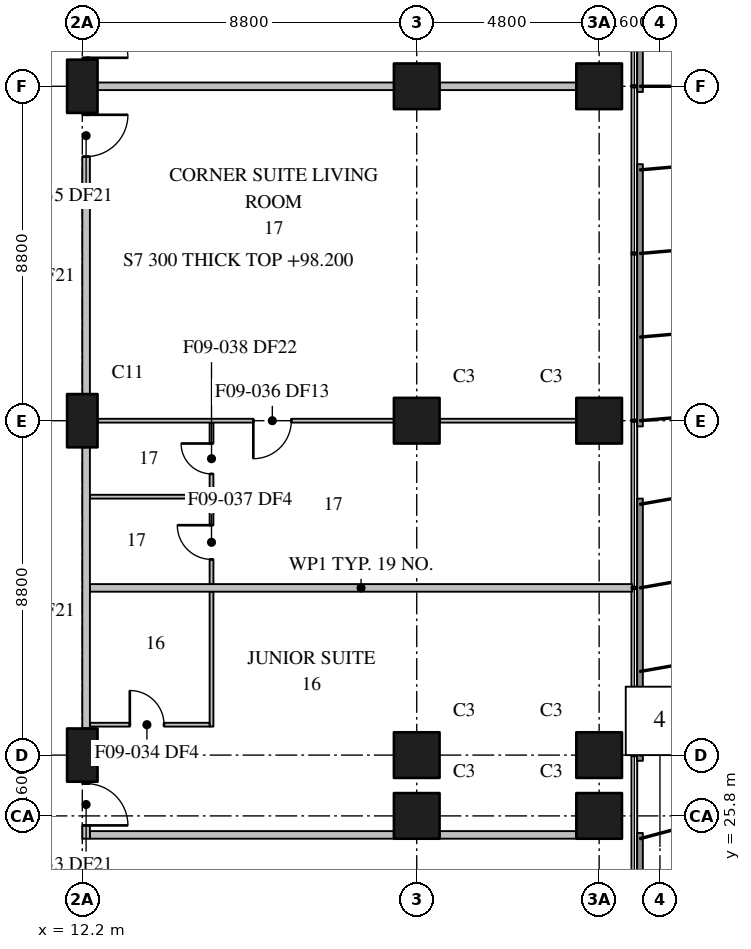
"""IFC4 building model, lengths in metres.
Left out: names, types, materials, properties, quantities, classifications, styles, units other than length and angle.
Written with IfcOpenShell. Run it as: python <this file> out.ifc"""

import sys

from ifc_helpers import new_model, si_unit, direction, frame, frame_2d, origin, origin_2d, place, context, subcontext, project, spatial, rectangle, extrude, element, fill, save


model = new_model("IFC4")
c1 = context("Model", 3, precision=1e-05, world=origin(), true_north=direction((0.0, 1.0)))
c2 = subcontext(c1, "Body", "Model", "MODEL_VIEW")
j1 = project(units=[si_unit("LENGTHUNIT", "METRE"), si_unit("PLANEANGLEUNIT", "RADIAN")], contexts=[c1])
p1 = place(None, origin())
s1 = spatial("IfcSite", under=j1, at=p1, CompositionType="ELEMENT")
p2 = place(p1, origin())
s2 = spatial("IfcBuilding", under=s1, at=p2, CompositionType="ELEMENT")
p3 = place(p2, frame((0.0, 0.0, 98.2)))
s3 = spatial("IfcBuildingStorey", under=s2, at=p3, CompositionType="ELEMENT", Elevation=98.2)
for number, where, z_axis, x_axis in (
    (1, (12.2, 27.4, 0.0), (0.0, 0.0, 1.0), (0.0, 1.0, 0.0)),
    (2, (12.2, 36.2, 0.0), (0.0, 0.0, 1.0), (0.0, 1.0, 0.0)),
    (3, (12.2, 45.0, 0.0), (0.0, 0.0, 1.0), (0.0, 1.0, 0.0)),
):
    element("IfcColumn", number, at=place(p3, frame(where, z_axis=z_axis, x_axis=x_axis)), inside=s3, PredefinedType="COLUMN", context=c2, shape_type="SweptSolid", body=[
        extrude(rectangle(XDim=1.4, YDim=0.8, at=origin_2d()), origin(), (0.0, 0.0, 1.0), 3.7),
    ])
for number, where, z_axis, x_axis in (
    (4, (21.0, 25.8, 0.0), (0.0, 0.0, 1.0), (1.0, 0.0, 0.0)),
    (5, (21.0, 27.4, 0.0), (0.0, 0.0, 1.0), (1.0, 0.0, 0.0)),
    (6, (21.0, 36.2, 0.0), (0.0, 0.0, 1.0), (1.0, 0.0, 0.0)),
    (7, (21.0, 45.0, 0.0), (0.0, 0.0, 1.0), (1.0, 0.0, 0.0)),
    (8, (25.8, 25.8, 0.0), (0.0, 0.0, 1.0), (1.0, 0.0, 0.0)),
    (9, (25.8, 27.4, 0.0), (0.0, 0.0, 1.0), (1.0, 0.0, 0.0)),
    (10, (25.8, 36.2, 0.0), (0.0, 0.0, 1.0), (1.0, 0.0, 0.0)),
    (11, (25.8, 45.0, 0.0), (0.0, 0.0, 1.0), (1.0, 0.0, 0.0)),
):
    element("IfcColumn", number, at=place(p3, frame(where, z_axis=z_axis, x_axis=x_axis)), inside=s3, PredefinedType="COLUMN", context=c2, shape_type="SweptSolid", body=[
        extrude(rectangle(XDim=1.2, YDim=1.2, at=origin_2d()), origin(), (0.0, 0.0, 1.0), 3.7),
    ])
p4 = place(p3, frame((12.4, 31.8, 0.0), z_axis=(0.0, 0.0, 1.0), x_axis=(1.0, 0.0, 0.0)))
e12 = element("IfcWall", 12, at=p4, inside=s3, PredefinedType="PARTITIONING", context=c2, shape_type="SweptSolid", body=[
    extrude(rectangle(XDim=14.27, YDim=0.2, at=frame_2d((7.135, 0.0))), origin(), (0.0, 0.0, 1.0), 3.3),
])
p5 = place(p3, frame((12.3, 26.7, 0.0), z_axis=(0.0, 0.0, 1.0), x_axis=(0.0, -1.0, 0.0)))
e13 = element("IfcWall", 13, at=p5, inside=s3, PredefinedType="PARTITIONING", context=c2, shape_type="SweptSolid", body=[
    extrude(rectangle(XDim=1.5, YDim=0.2, at=frame_2d((0.75, 0.0))), origin(), (0.0, 0.0, 1.0), 3.3),
])
p6 = place(p5, frame((0.05, 0.0, 0.0)))
e14 = element("IfcOpeningElement", 14, at=p6, cuts=e13, PredefinedType="OPENING", context=c2, shape_type="SweptSolid", body=[
    extrude(rectangle(XDim=1.1, YDim=2.1, at=frame_2d((0.55, 1.05))), frame((0.0, 0.11, 0.0), z_axis=(0.0, -1.0, 0.0), x_axis=(1.0, 0.0, 0.0)), (0.0, 0.0, 1.0), 0.22),
])
p7 = place(p3, frame((12.3, 28.1, 0.0), z_axis=(0.0, 0.0, 1.0), x_axis=(0.0, 1.0, 0.0)))
e15 = element("IfcWall", 15, at=p7, inside=s3, PredefinedType="PARTITIONING", context=c2, shape_type="SweptSolid", body=[
    extrude(rectangle(XDim=7.4, YDim=0.2, at=frame_2d((3.7, 0.0))), origin(), (0.0, 0.0, 1.0), 3.3),
])
p8 = place(p3, frame((12.3, 44.3, 0.0), z_axis=(0.0, 0.0, 1.0), x_axis=(0.0, -1.0, 0.0)))
e16 = element("IfcWall", 16, at=p8, inside=s3, PredefinedType="PARTITIONING", context=c2, shape_type="SweptSolid", body=[
    extrude(rectangle(XDim=7.4, YDim=0.2, at=frame_2d((3.7, 0.0))), origin(), (0.0, 0.0, 1.0), 3.3),
])
p9 = place(p8, frame((0.05, 0.0, 0.0)))
e17 = element("IfcOpeningElement", 17, at=p9, cuts=e16, PredefinedType="OPENING", context=c2, shape_type="SweptSolid", body=[
    extrude(rectangle(XDim=1.1, YDim=2.1, at=frame_2d((0.55, 1.05))), frame((0.0, 0.11, 0.0), z_axis=(0.0, -1.0, 0.0), x_axis=(1.0, 0.0, 0.0)), (0.0, 0.0, 1.0), 0.22),
])
p10 = place(p3, frame((12.3, 53.1, 0.0), z_axis=(0.0, 0.0, 1.0), x_axis=(0.0, -1.0, 0.0)))
e18 = element("IfcWall", 18, at=p10, inside=s3, PredefinedType="PARTITIONING", context=c2, shape_type="SweptSolid", body=[
    extrude(rectangle(XDim=7.4, YDim=0.2, at=frame_2d((3.7, 0.0))), origin(), (0.0, 0.0, 1.0), 3.3),
])
p11 = place(p10, frame((6.25, 0.0, 0.0)))
e19 = element("IfcOpeningElement", 19, at=p11, cuts=e18, PredefinedType="OPENING", context=c2, shape_type="SweptSolid", body=[
    extrude(rectangle(XDim=1.1, YDim=2.1, at=frame_2d((0.55, 1.05))), frame((0.0, 0.11, 0.0), z_axis=(0.0, -1.0, 0.0), x_axis=(1.0, 0.0, 0.0)), (0.0, 0.0, 1.0), 0.22),
])
p12 = place(p3, frame((12.4, 25.3, 0.0), z_axis=(0.0, 0.0, 1.0), x_axis=(1.0, 0.0, 0.0)))
e20 = element("IfcWall", 20, at=p12, inside=s3, PredefinedType="PARTITIONING", context=c2, shape_type="SweptSolid", body=[
    extrude(rectangle(XDim=8.0, YDim=0.2, at=frame_2d((4.0, 0.0))), origin(), (0.0, 0.0, 1.0), 3.3),
])
p13 = place(p3, frame((21.6, 25.3, 0.0), z_axis=(0.0, 0.0, 1.0), x_axis=(1.0, 0.0, 0.0)))
e21 = element("IfcWall", 21, at=p13, inside=s3, PredefinedType="PARTITIONING", context=c2, shape_type="SweptSolid", body=[
    extrude(rectangle(XDim=3.6, YDim=0.2, at=frame_2d((1.8, 0.0))), origin(), (0.0, 0.0, 1.0), 3.3),
])
p14 = place(p3, frame((12.6, 45.0, 0.0), z_axis=(0.0, 0.0, 1.0), x_axis=(1.0, 0.0, 0.0)))
e22 = element("IfcWall", 22, at=p14, inside=s3, PredefinedType="PARTITIONING", context=c2, shape_type="SweptSolid", body=[
    extrude(rectangle(XDim=7.8, YDim=0.2, at=frame_2d((3.9, 0.0))), origin(), (0.0, 0.0, 1.0), 3.3),
])
p15 = place(p3, frame((21.6, 45.0, 0.0), z_axis=(0.0, 0.0, 1.0), x_axis=(1.0, 0.0, 0.0)))
e23 = element("IfcWall", 23, at=p15, inside=s3, PredefinedType="PARTITIONING", context=c2, shape_type="SweptSolid", body=[
    extrude(rectangle(XDim=3.6, YDim=0.2, at=frame_2d((1.8, 0.0))), origin(), (0.0, 0.0, 1.0), 3.3),
])
p16 = place(p3, frame((15.6, 28.15, 0.0), z_axis=(0.0, 0.0, 1.0), x_axis=(0.0, 1.0, 0.0)))
e24 = element("IfcWall", 24, at=p16, inside=s3, PredefinedType="PARTITIONING", context=c2, shape_type="SweptSolid", body=[
    extrude(rectangle(XDim=3.55, YDim=0.1, at=frame_2d((1.775, 0.0))), origin(), (0.0, 0.0, 1.0), 3.3),
])
p17 = place(p3, frame((15.6, 31.9, 0.0), z_axis=(0.0, 0.0, 1.0), x_axis=(0.0, 1.0, 0.0)))
e25 = element("IfcWall", 25, at=p17, inside=s3, PredefinedType="PARTITIONING", context=c2, shape_type="SweptSolid", body=[
    extrude(rectangle(XDim=4.25, YDim=0.1, at=frame_2d((2.125, 0.0))), origin(), (0.0, 0.0, 1.0), 3.3),
])
p18 = place(p17, frame((0.65, 0.0, 0.0)))
e26 = element("IfcOpeningElement", 26, at=p18, cuts=e25, PredefinedType="OPENING", context=c2, shape_type="SweptSolid", body=[
    extrude(rectangle(XDim=0.9, YDim=2.1, at=frame_2d((0.45, 1.05))), frame((0.0, 0.06, 0.0), z_axis=(0.0, -1.0, 0.0), x_axis=(1.0, 0.0, 0.0)), (0.0, 0.0, 1.0), 0.12),
])
p19 = place(p17, frame((2.9, 0.0, 0.0)))
e27 = element("IfcOpeningElement", 27, at=p19, cuts=e25, PredefinedType="OPENING", context=c2, shape_type="SweptSolid", body=[
    extrude(rectangle(XDim=0.8, YDim=2.1, at=frame_2d((0.4, 1.05))), frame((0.0, 0.06, 0.0), z_axis=(0.0, -1.0, 0.0), x_axis=(1.0, 0.0, 0.0)), (0.0, 0.0, 1.0), 0.12),
])
p20 = place(p3, frame((12.4, 28.2, 0.0), z_axis=(0.0, 0.0, 1.0), x_axis=(1.0, 0.0, 0.0)))
e28 = element("IfcWall", 28, at=p20, inside=s3, PredefinedType="PARTITIONING", context=c2, shape_type="SweptSolid", body=[
    extrude(rectangle(XDim=3.15, YDim=0.1, at=frame_2d((1.575, 0.0))), origin(), (0.0, 0.0, 1.0), 3.3),
])
p21 = place(p20, frame((1.05, 0.0, 0.0)))
e29 = element("IfcOpeningElement", 29, at=p21, cuts=e28, PredefinedType="OPENING", context=c2, shape_type="SweptSolid", body=[
    extrude(rectangle(XDim=0.9, YDim=2.1, at=frame_2d((0.45, 1.05))), frame((0.0, 0.06, 0.0), z_axis=(0.0, -1.0, 0.0), x_axis=(1.0, 0.0, 0.0)), (0.0, 0.0, 1.0), 0.12),
])
p22 = place(p3, frame((20.4, 36.2, 0.0), z_axis=(0.0, 0.0, 1.0), x_axis=(-1.0, 0.0, 0.0)))
e30 = element("IfcWall", 30, at=p22, inside=s3, PredefinedType="PARTITIONING", context=c2, shape_type="SweptSolid", body=[
    extrude(rectangle(XDim=7.8, YDim=0.1, at=frame_2d((3.9, 0.0))), origin(), (0.0, 0.0, 1.0), 3.3),
])
p23 = place(p22, frame((2.7, 0.0, 0.0)))
e31 = element("IfcOpeningElement", 31, at=p23, cuts=e30, PredefinedType="OPENING", context=c2, shape_type="SweptSolid", body=[
    extrude(rectangle(XDim=1.0, YDim=2.1, at=frame_2d((0.5, 1.05))), frame((0.0, 0.06, 0.0), z_axis=(0.0, -1.0, 0.0), x_axis=(1.0, 0.0, 0.0)), (0.0, 0.0, 1.0), 0.12),
])
p24 = place(p3, frame((21.6, 36.2, 0.0), z_axis=(0.0, 0.0, 1.0), x_axis=(1.0, 0.0, 0.0)))
e32 = element("IfcWall", 32, at=p24, inside=s3, PredefinedType="PARTITIONING", context=c2, shape_type="SweptSolid", body=[
    extrude(rectangle(XDim=3.6, YDim=0.1, at=frame_2d((1.8, 0.0))), origin(), (0.0, 0.0, 1.0), 3.3),
])
p25 = place(p3, frame((12.4, 34.2, 0.0), z_axis=(0.0, 0.0, 1.0), x_axis=(1.0, 0.0, 0.0)))
e33 = element("IfcWall", 33, at=p25, inside=s3, PredefinedType="PARTITIONING", context=c2, shape_type="SweptSolid", body=[
    extrude(rectangle(XDim=3.15, YDim=0.1, at=frame_2d((1.575, 0.0))), origin(), (0.0, 0.0, 1.0), 3.3),
])
p26 = place(p6, origin())
e34 = element("IfcDoor", 34, at=p26, inside=s3, OperationType="SINGLE_SWING_RIGHT", PredefinedType="DOOR", context=c2, shape_type="SweptSolid", body=[
    extrude(rectangle(XDim=1.1, YDim=2.1, at=frame_2d((0.55, 1.05))), frame((0.0, 0.025, 0.0), z_axis=(0.0, -1.0, 0.0), x_axis=(1.0, 0.0, 0.0)), (0.0, 0.0, 1.0), 0.05),
])
fill(e14, e34)
p27 = place(p21, origin())
e35 = element("IfcDoor", 35, at=p27, inside=s3, OperationType="SINGLE_SWING_LEFT", PredefinedType="DOOR", context=c2, shape_type="SweptSolid", body=[
    extrude(rectangle(XDim=0.9, YDim=2.1, at=frame_2d((0.45, 1.05))), frame((0.0, 0.025, 0.0), z_axis=(0.0, -1.0, 0.0), x_axis=(1.0, 0.0, 0.0)), (0.0, 0.0, 1.0), 0.05),
])
fill(e29, e35)
p28 = place(p9, origin())
e36 = element("IfcDoor", 36, at=p28, inside=s3, OperationType="SINGLE_SWING_LEFT", PredefinedType="DOOR", context=c2, shape_type="SweptSolid", body=[
    extrude(rectangle(XDim=1.1, YDim=2.1, at=frame_2d((0.55, 1.05))), frame((0.0, 0.025, 0.0), z_axis=(0.0, -1.0, 0.0), x_axis=(1.0, 0.0, 0.0)), (0.0, 0.0, 1.0), 0.05),
])
fill(e17, e36)
p29 = place(p23, origin())
e37 = element("IfcDoor", 37, at=p29, inside=s3, OperationType="SINGLE_SWING_RIGHT", PredefinedType="DOOR", context=c2, shape_type="SweptSolid", body=[
    extrude(rectangle(XDim=1.0, YDim=2.1, at=frame_2d((0.5, 1.05))), frame((0.0, 0.025, 0.0), z_axis=(0.0, -1.0, 0.0), x_axis=(1.0, 0.0, 0.0)), (0.0, 0.0, 1.0), 0.05),
])
fill(e31, e37)
p30 = place(p18, origin())
e38 = element("IfcDoor", 38, at=p30, inside=s3, OperationType="SINGLE_SWING_RIGHT", PredefinedType="DOOR", context=c2, shape_type="SweptSolid", body=[
    extrude(rectangle(XDim=0.9, YDim=2.1, at=frame_2d((0.45, 1.05))), frame((0.0, 0.025, 0.0), z_axis=(0.0, -1.0, 0.0), x_axis=(1.0, 0.0, 0.0)), (0.0, 0.0, 1.0), 0.05),
])
fill(e26, e38)
p31 = place(p19, origin())
e39 = element("IfcDoor", 39, at=p31, inside=s3, OperationType="SINGLE_SWING_RIGHT", PredefinedType="DOOR", context=c2, shape_type="SweptSolid", body=[
    extrude(rectangle(XDim=0.8, YDim=2.1, at=frame_2d((0.4, 1.05))), frame((0.0, 0.025, 0.0), z_axis=(0.0, -1.0, 0.0), x_axis=(1.0, 0.0, 0.0)), (0.0, 0.0, 1.0), 0.05),
])
fill(e27, e39)
p32 = place(p11, origin())
e40 = element("IfcDoor", 40, at=p32, inside=s3, OperationType="SINGLE_SWING_RIGHT", PredefinedType="DOOR", context=c2, shape_type="SweptSolid", body=[
    extrude(rectangle(XDim=1.1, YDim=2.1, at=frame_2d((0.55, 1.05))), frame((0.0, 0.025, 0.0), z_axis=(0.0, -1.0, 0.0), x_axis=(1.0, 0.0, 0.0)), (0.0, 0.0, 1.0), 0.05),
])
fill(e19, e40)
save(model, sys.argv[1])
